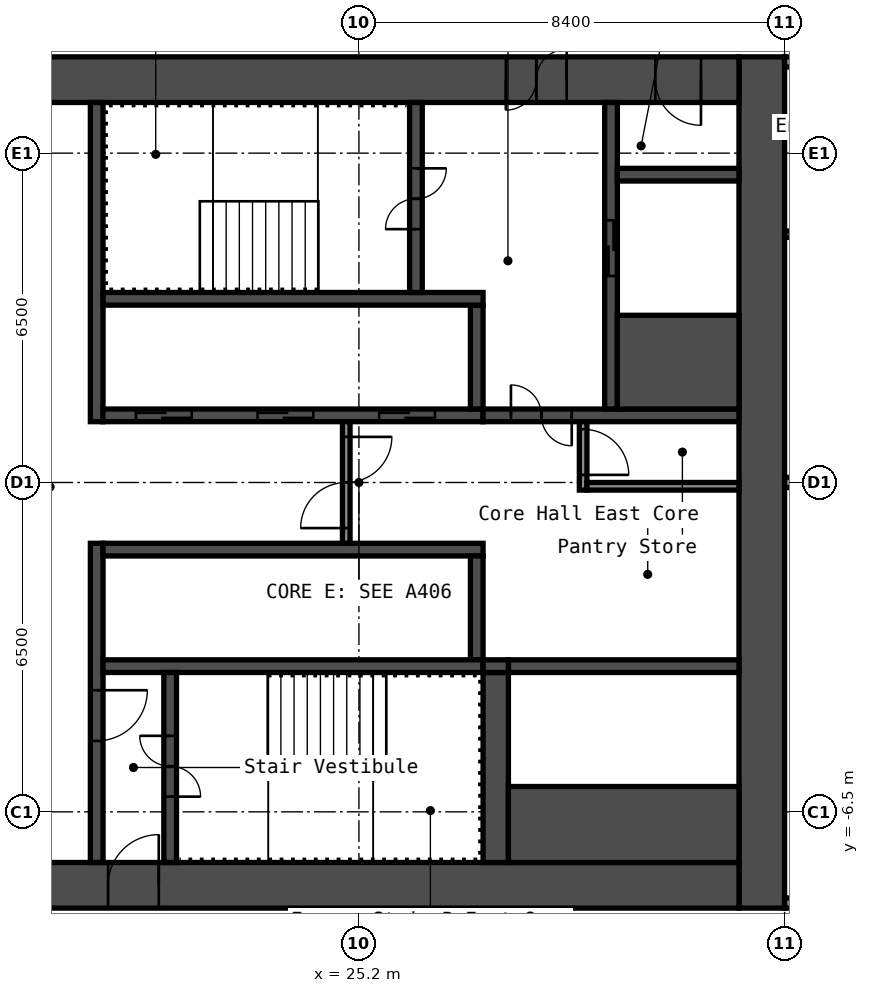
"""IFC4 building model, lengths in metres.
Left out: names, types, materials, properties, quantities, classifications, styles, units other than length and angle.
Written with IfcOpenShell. Run it as: python <this file> out.ifc"""

import sys

from ifc_helpers import new_model, si_unit, direction, frame, frame_2d, origin, place, context, subcontext, project, spatial, rectangle, extrude, element, fill, save


model = new_model("IFC4")
c1 = context("Model", 3, precision=1e-05, world=origin(), true_north=direction((0.0, 1.0)))
c2 = subcontext(c1, "Body", "Model", "MODEL_VIEW")
j1 = project(units=[si_unit("LENGTHUNIT", "METRE"), si_unit("PLANEANGLEUNIT", "RADIAN")], contexts=[c1])
p1 = place(None, origin())
s1 = spatial("IfcSite", under=j1, at=p1, CompositionType="ELEMENT")
p2 = place(p1, origin())
s2 = spatial("IfcBuilding", under=s1, at=p2, CompositionType="ELEMENT")
p3 = place(p2, frame((0.0, 0.0, 45.4)))
s3 = spatial("IfcBuildingStorey", under=s2, at=p3, CompositionType="ELEMENT", Elevation=45.4)
p4 = place(p3, frame((33.15, -8.4, 0.0), z_axis=(0.0, 0.0, 1.0), x_axis=(0.0, 1.0, 0.0)))
e1 = element("IfcWall", 1, at=p4, inside=s3, PredefinedType="SHEAR", context=c2, shape_type="SweptSolid", body=[
    extrude(rectangle(XDim=16.8, YDim=0.9, at=frame_2d((8.4, 0.0))), origin(), (0.0, 0.0, 1.0), 2.8),
])
p5 = place(p3, frame((17.7, 7.95, 0.0), z_axis=(0.0, 0.0, 1.0), x_axis=(1.0, 0.0, 0.0)))
e2 = element("IfcWall", 2, at=p5, inside=s3, PredefinedType="SHEAR", context=c2, shape_type="SweptSolid", body=[
    extrude(rectangle(XDim=15.0, YDim=0.9, at=frame_2d((7.5, 0.0))), origin(), (0.0, 0.0, 1.0), 2.8),
])
p6 = place(p5, frame((10.4, 0.0, 0.0)))
e3 = element("IfcOpeningElement", 3, at=p6, cuts=e2, PredefinedType="OPENING", context=c2, shape_type="SweptSolid", body=[
    extrude(rectangle(XDim=1.2, YDim=2.1, at=frame_2d((0.6, 1.05))), frame((0.0, 0.46, 0.0), z_axis=(0.0, -1.0, 0.0), x_axis=(1.0, 0.0, 0.0)), (0.0, 0.0, 1.0), 0.92),
])
p7 = place(p5, frame((13.35, 0.0, 0.0)))
e4 = element("IfcOpeningElement", 4, at=p7, cuts=e2, PredefinedType="OPENING", context=c2, shape_type="SweptSolid", body=[
    extrude(rectangle(XDim=0.9, YDim=2.1, at=frame_2d((0.45, 1.05))), frame((0.0, 0.46, 0.0), z_axis=(0.0, -1.0, 0.0), x_axis=(1.0, 0.0, 0.0)), (0.0, 0.0, 1.0), 0.92),
])
p8 = place(p3, frame((17.7, -7.95, 0.0), z_axis=(0.0, 0.0, 1.0), x_axis=(1.0, 0.0, 0.0)))
e5 = element("IfcWall", 5, at=p8, inside=s3, PredefinedType="SHEAR", context=c2, shape_type="SweptSolid", body=[
    extrude(rectangle(XDim=15.0, YDim=0.9, at=frame_2d((7.5, 0.0))), origin(), (0.0, 0.0, 1.0), 2.8),
])
p9 = place(p8, frame((2.55, 0.0, 0.0)))
e6 = element("IfcOpeningElement", 6, at=p9, cuts=e5, PredefinedType="OPENING", context=c2, shape_type="SweptSolid", body=[
    extrude(rectangle(XDim=1.0, YDim=2.1, at=frame_2d((0.5, 1.05))), frame((0.0, 0.46, 0.0), z_axis=(0.0, -1.0, 0.0), x_axis=(1.0, 0.0, 0.0)), (0.0, 0.0, 1.0), 0.92),
])
p10 = place(p3, frame((20.025, 1.2, 0.0), z_axis=(0.0, 0.0, 1.0), x_axis=(0.0, 1.0, 0.0)))
e7 = element("IfcWall", 7, at=p10, inside=s3, PredefinedType="SHEAR", context=c2, shape_type="SweptSolid", body=[
    extrude(rectangle(XDim=6.3, YDim=0.25, at=frame_2d((3.15, 0.0))), origin(), (0.0, 0.0, 1.0), 2.8),
])
p11 = place(p3, frame((20.025, -7.5, 0.0), z_axis=(0.0, 0.0, 1.0), x_axis=(0.0, 1.0, 0.0)))
e8 = element("IfcWall", 8, at=p11, inside=s3, PredefinedType="SHEAR", context=c2, shape_type="SweptSolid", body=[
    extrude(rectangle(XDim=6.3, YDim=0.25, at=frame_2d((3.15, 0.0))), origin(), (0.0, 0.0, 1.0), 2.8),
])
p12 = place(p11, frame((2.4, 0.0, 0.0)))
e9 = element("IfcOpeningElement", 9, at=p12, cuts=e8, PredefinedType="OPENING", context=c2, shape_type="SweptSolid", body=[
    extrude(rectangle(XDim=1.0, YDim=2.1, at=frame_2d((0.5, 1.05))), frame((0.0, 0.135, 0.0), z_axis=(0.0, -1.0, 0.0), x_axis=(1.0, 0.0, 0.0)), (0.0, 0.0, 1.0), 0.27),
])
p13 = place(p3, frame((20.15, 1.325, 0.0), z_axis=(0.0, 0.0, 1.0), x_axis=(1.0, 0.0, 0.0)))
e10 = element("IfcWall", 10, at=p13, inside=s3, PredefinedType="SHEAR", context=c2, shape_type="SweptSolid", body=[
    extrude(rectangle(XDim=7.5, YDim=0.25, at=frame_2d((3.75, 0.0))), origin(), (0.0, 0.0, 1.0), 2.8),
])
p14 = place(p13, frame((0.65, 0.0, 0.0)))
e11 = element("IfcOpeningElement", 11, at=p14, cuts=e10, PredefinedType="OPENING", context=c2, shape_type="SweptSolid", body=[
    extrude(rectangle(XDim=1.1, YDim=2.1, at=frame_2d((0.55, 1.05))), frame((0.0, 0.135, 0.0), z_axis=(0.0, -1.0, 0.0), x_axis=(1.0, 0.0, 0.0)), (0.0, 0.0, 1.0), 0.27),
])
p15 = place(p13, frame((3.05, 0.0, 0.0)))
e12 = element("IfcOpeningElement", 12, at=p15, cuts=e10, PredefinedType="OPENING", context=c2, shape_type="SweptSolid", body=[
    extrude(rectangle(XDim=1.1, YDim=2.1, at=frame_2d((0.55, 1.05))), frame((0.0, 0.135, 0.0), z_axis=(0.0, -1.0, 0.0), x_axis=(1.0, 0.0, 0.0)), (0.0, 0.0, 1.0), 0.27),
])
p16 = place(p13, frame((5.45, 0.0, 0.0)))
e13 = element("IfcOpeningElement", 13, at=p16, cuts=e10, PredefinedType="OPENING", context=c2, shape_type="SweptSolid", body=[
    extrude(rectangle(XDim=1.1, YDim=2.1, at=frame_2d((0.55, 1.05))), frame((0.0, 0.135, 0.0), z_axis=(0.0, -1.0, 0.0), x_axis=(1.0, 0.0, 0.0)), (0.0, 0.0, 1.0), 0.27),
])
p17 = place(p3, frame((27.525, 1.45, 0.0), z_axis=(0.0, 0.0, 1.0), x_axis=(0.0, 1.0, 0.0)))
e14 = element("IfcWall", 14, at=p17, inside=s3, PredefinedType="SHEAR", context=c2, shape_type="SweptSolid", body=[
    extrude(rectangle(XDim=2.05, YDim=0.25, at=frame_2d((1.025, 0.0))), origin(), (0.0, 0.0, 1.0), 2.8),
])
p18 = place(p3, frame((20.15, 3.625, 0.0), z_axis=(0.0, 0.0, 1.0), x_axis=(1.0, 0.0, 0.0)))
e15 = element("IfcWall", 15, at=p18, inside=s3, PredefinedType="SHEAR", context=c2, shape_type="SweptSolid", body=[
    extrude(rectangle(XDim=7.5, YDim=0.25, at=frame_2d((3.75, 0.0))), origin(), (0.0, 0.0, 1.0), 2.8),
])
p19 = place(p3, frame((26.325, 3.75, 0.0), z_axis=(0.0, 0.0, 1.0), x_axis=(0.0, 1.0, 0.0)))
e16 = element("IfcWall", 16, at=p19, inside=s3, PredefinedType="SHEAR", context=c2, shape_type="SweptSolid", body=[
    extrude(rectangle(XDim=3.75, YDim=0.25, at=frame_2d((1.875, 0.0))), origin(), (0.0, 0.0, 1.0), 2.8),
])
p20 = place(p19, frame((1.25, 0.0, 0.0)))
e17 = element("IfcOpeningElement", 17, at=p20, cuts=e16, PredefinedType="OPENING", context=c2, shape_type="SweptSolid", body=[
    extrude(rectangle(XDim=1.2, YDim=2.1, at=frame_2d((0.6, 1.05))), frame((0.0, 0.135, 0.0), z_axis=(0.0, -1.0, 0.0), x_axis=(1.0, 0.0, 0.0)), (0.0, 0.0, 1.0), 0.27),
])
p21 = place(p3, frame((27.65, 1.325, 0.0), z_axis=(0.0, 0.0, 1.0), x_axis=(1.0, 0.0, 0.0)))
e18 = element("IfcWall", 18, at=p21, inside=s3, PredefinedType="SHEAR", context=c2, shape_type="SweptSolid", body=[
    extrude(rectangle(XDim=5.05, YDim=0.25, at=frame_2d((2.525, 0.0))), origin(), (0.0, 0.0, 1.0), 2.8),
])
p22 = place(p21, frame((0.55, 0.0, 0.0)))
e19 = element("IfcOpeningElement", 19, at=p22, cuts=e18, PredefinedType="OPENING", context=c2, shape_type="SweptSolid", body=[
    extrude(rectangle(XDim=1.2, YDim=2.1, at=frame_2d((0.6, 1.05))), frame((0.0, 0.135, 0.0), z_axis=(0.0, -1.0, 0.0), x_axis=(1.0, 0.0, 0.0)), (0.0, 0.0, 1.0), 0.27),
])
p23 = place(p3, frame((30.175, 1.45, 0.0), z_axis=(0.0, 0.0, 1.0), x_axis=(0.0, 1.0, 0.0)))
e20 = element("IfcWall", 20, at=p23, inside=s3, PredefinedType="SHEAR", context=c2, shape_type="SweptSolid", body=[
    extrude(rectangle(XDim=6.05, YDim=0.25, at=frame_2d((3.025, 0.0))), origin(), (0.0, 0.0, 1.0), 2.8),
])
p24 = place(p23, frame((2.625, 0.0, 0.0)))
e21 = element("IfcOpeningElement", 21, at=p24, cuts=e20, PredefinedType="OPENING", context=c2, shape_type="SweptSolid", body=[
    extrude(rectangle(XDim=1.1, YDim=2.1, at=frame_2d((0.55, 1.05))), frame((0.0, 0.135, 0.0), z_axis=(0.0, -1.0, 0.0), x_axis=(1.0, 0.0, 0.0)), (0.0, 0.0, 1.0), 0.27),
])
p25 = place(p3, frame((30.3, 2.375, 0.0), z_axis=(0.0, 0.0, 1.0), x_axis=(1.0, 0.0, 0.0)))
e22 = element("IfcWall", 22, at=p25, inside=s3, PredefinedType="SHEAR", context=c2, shape_type="SweptSolid", body=[
    extrude(rectangle(XDim=2.4, YDim=1.85, at=frame_2d((1.2, 0.0))), origin(), (0.0, 0.0, 1.0), 2.8),
])
p26 = place(p3, frame((30.3, 6.075, 0.0), z_axis=(0.0, 0.0, 1.0), x_axis=(1.0, 0.0, 0.0)))
e23 = element("IfcWall", 23, at=p26, inside=s3, PredefinedType="SHEAR", context=c2, shape_type="SweptSolid", body=[
    extrude(rectangle(XDim=2.4, YDim=0.25, at=frame_2d((1.2, 0.0))), origin(), (0.0, 0.0, 1.0), 2.8),
])
p27 = place(p3, frame((20.15, -1.325, 0.0), z_axis=(0.0, 0.0, 1.0), x_axis=(1.0, 0.0, 0.0)))
e24 = element("IfcWall", 24, at=p27, inside=s3, PredefinedType="SHEAR", context=c2, shape_type="SweptSolid", body=[
    extrude(rectangle(XDim=7.5, YDim=0.25, at=frame_2d((3.75, 0.0))), origin(), (0.0, 0.0, 1.0), 2.8),
])
p28 = place(p3, frame((27.525, -3.5, 0.0), z_axis=(0.0, 0.0, 1.0), x_axis=(0.0, 1.0, 0.0)))
e25 = element("IfcWall", 25, at=p28, inside=s3, PredefinedType="SHEAR", context=c2, shape_type="SweptSolid", body=[
    extrude(rectangle(XDim=2.05, YDim=0.25, at=frame_2d((1.025, 0.0))), origin(), (0.0, 0.0, 1.0), 2.8),
])
p29 = place(p3, frame((20.15, -3.625, 0.0), z_axis=(0.0, 0.0, 1.0), x_axis=(1.0, 0.0, 0.0)))
e26 = element("IfcWall", 26, at=p29, inside=s3, PredefinedType="SHEAR", context=c2, shape_type="SweptSolid", body=[
    extrude(rectangle(XDim=7.5, YDim=0.25, at=frame_2d((3.75, 0.0))), origin(), (0.0, 0.0, 1.0), 2.8),
])
p30 = place(p3, frame((21.475, -7.5, 0.0), z_axis=(0.0, 0.0, 1.0), x_axis=(0.0, 1.0, 0.0)))
e27 = element("IfcWall", 27, at=p30, inside=s3, PredefinedType="SHEAR", context=c2, shape_type="SweptSolid", body=[
    extrude(rectangle(XDim=3.75, YDim=0.25, at=frame_2d((1.875, 0.0))), origin(), (0.0, 0.0, 1.0), 2.8),
])
p31 = place(p30, frame((1.3, 0.0, 0.0)))
e28 = element("IfcOpeningElement", 28, at=p31, cuts=e27, PredefinedType="OPENING", context=c2, shape_type="SweptSolid", body=[
    extrude(rectangle(XDim=1.2, YDim=2.1, at=frame_2d((0.6, 1.05))), frame((0.0, 0.135, 0.0), z_axis=(0.0, -1.0, 0.0), x_axis=(1.0, 0.0, 0.0)), (0.0, 0.0, 1.0), 0.27),
])
p32 = place(p3, frame((27.9, -7.5, 0.0), z_axis=(0.0, 0.0, 1.0), x_axis=(0.0, 1.0, 0.0)))
e29 = element("IfcWall", 29, at=p32, inside=s3, PredefinedType="SHEAR", context=c2, shape_type="SweptSolid", body=[
    extrude(rectangle(XDim=3.75, YDim=0.5, at=frame_2d((1.875, 0.0))), origin(), (0.0, 0.0, 1.0), 2.8),
])
p33 = place(p3, frame((28.15, -3.625, 0.0), z_axis=(0.0, 0.0, 1.0), x_axis=(1.0, 0.0, 0.0)))
e30 = element("IfcWall", 30, at=p33, inside=s3, PredefinedType="SHEAR", context=c2, shape_type="SweptSolid", body=[
    extrude(rectangle(XDim=4.55, YDim=0.25, at=frame_2d((2.275, 0.0))), origin(), (0.0, 0.0, 1.0), 2.8),
])
p34 = place(p3, frame((28.15, -6.75, 0.0), z_axis=(0.0, 0.0, 1.0), x_axis=(1.0, 0.0, 0.0)))
e31 = element("IfcWall", 31, at=p34, inside=s3, PredefinedType="SHEAR", context=c2, shape_type="SweptSolid", body=[
    extrude(rectangle(XDim=4.55, YDim=1.5, at=frame_2d((2.275, 0.0))), origin(), (0.0, 0.0, 1.0), 2.8),
])
p35 = place(p3, frame((27.65, -3.625, 0.0), z_axis=(0.0, 0.0, 1.0), x_axis=(1.0, 0.0, 0.0)))
e32 = element("IfcWall", 32, at=p35, inside=s3, PredefinedType="SHEAR", context=c2, shape_type="SweptSolid", body=[
    extrude(rectangle(XDim=0.5, YDim=0.25, at=frame_2d((0.25, 0.0))), origin(), (0.0, 0.0, 1.0), 2.8),
])
p36 = place(p3, frame((24.95, -1.2, 0.0), z_axis=(0.0, 0.0, 1.0), x_axis=(0.0, 1.0, 0.0)))
e33 = element("IfcWall", 33, at=p36, inside=s3, PredefinedType="PARTITIONING", context=c2, shape_type="SweptSolid", body=[
    extrude(rectangle(XDim=2.4, YDim=0.15, at=frame_2d((1.2, 0.0))), origin(), (0.0, 0.0, 1.0), 2.8),
])
p37 = place(p36, frame((0.3, 0.0, 0.0)))
e34 = element("IfcOpeningElement", 34, at=p37, cuts=e33, PredefinedType="OPENING", context=c2, shape_type="SweptSolid", body=[
    extrude(rectangle(XDim=1.8, YDim=2.1, at=frame_2d((0.9, 1.05))), frame((0.0, 0.085, 0.0), z_axis=(0.0, -1.0, 0.0), x_axis=(1.0, 0.0, 0.0)), (0.0, 0.0, 1.0), 0.17),
])
p38 = place(p3, frame((29.625, -0.15, 0.0), z_axis=(0.0, 0.0, 1.0), x_axis=(0.0, 1.0, 0.0)))
e35 = element("IfcWall", 35, at=p38, inside=s3, PredefinedType="PARTITIONING", context=c2, shape_type="SweptSolid", body=[
    extrude(rectangle(XDim=1.35, YDim=0.15, at=frame_2d((0.675, 0.0))), origin(), (0.0, 0.0, 1.0), 2.8),
])
p39 = place(p38, frame((0.3, 0.0, 0.0)))
e36 = element("IfcOpeningElement", 36, at=p39, cuts=e35, PredefinedType="OPENING", context=c2, shape_type="SweptSolid", body=[
    extrude(rectangle(XDim=0.9, YDim=2.1, at=frame_2d((0.45, 1.05))), frame((0.0, 0.085, 0.0), z_axis=(0.0, -1.0, 0.0), x_axis=(1.0, 0.0, 0.0)), (0.0, 0.0, 1.0), 0.17),
])
p40 = place(p3, frame((29.7, -0.075, 0.0), z_axis=(0.0, 0.0, 1.0), x_axis=(1.0, 0.0, 0.0)))
e37 = element("IfcWall", 37, at=p40, inside=s3, PredefinedType="PARTITIONING", context=c2, shape_type="SweptSolid", body=[
    extrude(rectangle(XDim=3.0, YDim=0.15, at=frame_2d((1.5, 0.0))), origin(), (0.0, 0.0, 1.0), 2.8),
])
p41 = place(p3, frame((33.6, -8.3, 0.0), z_axis=(0.0, 0.0, 1.0), x_axis=(1.0, 0.0, 0.0)))
e38 = element("IfcWall", 38, at=p41, inside=s3, PredefinedType="PARTITIONING", context=c2, shape_type="SweptSolid", body=[
    extrude(rectangle(XDim=15.0, YDim=0.2, at=frame_2d((7.5, 0.0))), origin(), (0.0, 0.0, 1.0), 2.8),
])
p42 = place(p41, frame((3.7, 0.0, 0.0)))
e39 = element("IfcOpeningElement", 39, at=p42, cuts=e38, PredefinedType="OPENING", context=c2, shape_type="SweptSolid", body=[
    extrude(rectangle(XDim=1.0, YDim=2.1, at=frame_2d((0.5, 1.05))), frame((0.0, 0.11, 0.0), z_axis=(0.0, -1.0, 0.0), x_axis=(1.0, 0.0, 0.0)), (0.0, 0.0, 1.0), 0.22),
])
p43 = place(p41, frame((9.5, 0.0, 0.0)))
e40 = element("IfcOpeningElement", 40, at=p43, cuts=e38, PredefinedType="OPENING", context=c2, shape_type="SweptSolid", body=[
    extrude(rectangle(XDim=1.0, YDim=2.1, at=frame_2d((0.5, 1.05))), frame((0.0, 0.11, 0.0), z_axis=(0.0, -1.0, 0.0), x_axis=(1.0, 0.0, 0.0)), (0.0, 0.0, 1.0), 0.22),
])
p44 = place(p3, frame((33.6, 0.0, 0.0), z_axis=(0.0, 0.0, 1.0), x_axis=(1.0, 0.0, 0.0)))
e41 = element("IfcWall", 41, at=p44, inside=s3, PredefinedType="PARTITIONING", context=c2, shape_type="SweptSolid", body=[
    extrude(rectangle(XDim=14.9, YDim=0.2, at=frame_2d((7.45, 0.0))), origin(), (0.0, 0.0, 1.0), 2.8),
])
p45 = place(p3, frame((33.6, 4.9, 0.0), z_axis=(0.0, 0.0, 1.0), x_axis=(1.0, 0.0, 0.0)))
e42 = element("IfcWall", 42, at=p45, inside=s3, PredefinedType="PARTITIONING", context=c2, shape_type="SweptSolid", body=[
    extrude(rectangle(XDim=3.737, YDim=0.125, at=frame_2d((1.869, 0.0))), origin(), (0.0, 0.0, 1.0), 2.8),
])
p46 = place(p45, frame((1.5, 0.0, 0.0)))
e43 = element("IfcOpeningElement", 43, at=p46, cuts=e42, PredefinedType="OPENING", context=c2, shape_type="SweptSolid", body=[
    extrude(rectangle(XDim=0.8, YDim=2.1, at=frame_2d((0.4, 1.05))), frame((0.0, 0.073, 0.0), z_axis=(0.0, -1.0, 0.0), x_axis=(1.0, 0.0, 0.0)), (0.0, 0.0, 1.0), 0.145),
])
p47 = place(p3, frame((33.6, 8.3, 0.0), z_axis=(0.0, 0.0, 1.0), x_axis=(1.0, 0.0, 0.0)))
e44 = element("IfcWall", 44, at=p47, inside=s3, PredefinedType="PARTITIONING", context=c2, shape_type="SweptSolid", body=[
    extrude(rectangle(XDim=15.0, YDim=0.2, at=frame_2d((7.5, 0.0))), origin(), (0.0, 0.0, 1.0), 2.8),
])
p48 = place(p47, frame((9.55, 0.0, 0.0)))
e45 = element("IfcOpeningElement", 45, at=p48, cuts=e44, PredefinedType="OPENING", context=c2, shape_type="SweptSolid", body=[
    extrude(rectangle(XDim=1.6, YDim=2.1, at=frame_2d((0.8, 1.05))), frame((0.0, 0.11, 0.0), z_axis=(0.0, -1.0, 0.0), x_axis=(1.0, 0.0, 0.0)), (0.0, 0.0, 1.0), 0.22),
])
p49 = place(p6, origin())
e46 = element("IfcDoor", 46, at=p49, inside=s3, OperationType="DOUBLE_DOOR_SINGLE_SWING", PredefinedType="DOOR", context=c2, shape_type="SweptSolid", body=[
    extrude(rectangle(XDim=1.2, YDim=2.1, at=frame_2d((0.6, 1.05))), frame((0.0, 0.025, 0.0), z_axis=(0.0, -1.0, 0.0), x_axis=(1.0, 0.0, 0.0)), (0.0, 0.0, 1.0), 0.05),
])
fill(e3, e46)
p50 = place(p7, origin())
e47 = element("IfcDoor", 47, at=p50, inside=s3, OperationType="SINGLE_SWING_RIGHT", PredefinedType="DOOR", context=c2, shape_type="SweptSolid", body=[
    extrude(rectangle(XDim=0.9, YDim=2.1, at=frame_2d((0.45, 1.05))), frame((0.0, 0.025, 0.0), z_axis=(0.0, -1.0, 0.0), x_axis=(1.0, 0.0, 0.0)), (0.0, 0.0, 1.0), 0.05),
])
fill(e4, e47)
p51 = place(p9, origin())
e48 = element("IfcDoor", 48, at=p51, inside=s3, OperationType="SINGLE_SWING_LEFT", PredefinedType="DOOR", context=c2, shape_type="SweptSolid", body=[
    extrude(rectangle(XDim=1.0, YDim=2.1, at=frame_2d((0.5, 1.05))), frame((0.0, 0.025, 0.0), z_axis=(0.0, -1.0, 0.0), x_axis=(1.0, 0.0, 0.0)), (0.0, 0.0, 1.0), 0.05),
])
fill(e6, e48)
p52 = place(p20, origin())
e49 = element("IfcDoor", 49, at=p52, inside=s3, OperationType="DOUBLE_DOOR_SINGLE_SWING", PredefinedType="DOOR", context=c2, shape_type="SweptSolid", body=[
    extrude(rectangle(XDim=1.2, YDim=2.1, at=frame_2d((0.6, 1.05))), frame((0.0, 0.025, 0.0), z_axis=(0.0, -1.0, 0.0), x_axis=(1.0, 0.0, 0.0)), (0.0, 0.0, 1.0), 0.05),
])
fill(e17, e49)
p53 = place(p31, origin())
e50 = element("IfcDoor", 50, at=p53, inside=s3, OperationType="DOUBLE_DOOR_SINGLE_SWING", PredefinedType="DOOR", context=c2, shape_type="SweptSolid", body=[
    extrude(rectangle(XDim=1.2, YDim=2.1, at=frame_2d((0.6, 1.05))), frame((0.0, 0.025, 0.0), z_axis=(0.0, -1.0, 0.0), x_axis=(1.0, 0.0, 0.0)), (0.0, 0.0, 1.0), 0.05),
])
fill(e28, e50)
p54 = place(p12, origin())
e51 = element("IfcDoor", 51, at=p54, inside=s3, OperationType="SINGLE_SWING_RIGHT", PredefinedType="DOOR", context=c2, shape_type="SweptSolid", body=[
    extrude(rectangle(XDim=1.0, YDim=2.1, at=frame_2d((0.5, 1.05))), frame((0.0, 0.025, 0.0), z_axis=(0.0, -1.0, 0.0), x_axis=(1.0, 0.0, 0.0)), (0.0, 0.0, 1.0), 0.05),
])
fill(e9, e51)
p55 = place(p22, origin())
e52 = element("IfcDoor", 52, at=p55, inside=s3, OperationType="DOUBLE_DOOR_SINGLE_SWING", PredefinedType="DOOR", context=c2, shape_type="SweptSolid", body=[
    extrude(rectangle(XDim=1.2, YDim=2.1, at=frame_2d((0.6, 1.05))), frame((0.0, 0.025, 0.0), z_axis=(0.0, -1.0, 0.0), x_axis=(1.0, 0.0, 0.0)), (0.0, 0.0, 1.0), 0.05),
])
fill(e19, e52)
p56 = place(p37, origin())
e53 = element("IfcDoor", 53, at=p56, inside=s3, OperationType="DOUBLE_DOOR_SINGLE_SWING", PredefinedType="DOOR", context=c2, shape_type="SweptSolid", body=[
    extrude(rectangle(XDim=1.8, YDim=2.1, at=frame_2d((0.9, 1.05))), frame((0.0, 0.025, 0.0), z_axis=(0.0, -1.0, 0.0), x_axis=(1.0, 0.0, 0.0)), (0.0, 0.0, 1.0), 0.05),
])
fill(e34, e53)
p57 = place(p39, origin())
e54 = element("IfcDoor", 54, at=p57, inside=s3, OperationType="SINGLE_SWING_LEFT", PredefinedType="DOOR", context=c2, shape_type="SweptSolid", body=[
    extrude(rectangle(XDim=0.9, YDim=2.1, at=frame_2d((0.45, 1.05))), frame((0.0, 0.025, 0.0), z_axis=(0.0, -1.0, 0.0), x_axis=(1.0, 0.0, 0.0)), (0.0, 0.0, 1.0), 0.05),
])
fill(e36, e54)
p58 = place(p14, origin())
e55 = element("IfcDoor", 55, at=p58, inside=s3, OperationType="DOUBLE_DOOR_SLIDING", PredefinedType="DOOR", context=c2, shape_type="SweptSolid", body=[
    extrude(rectangle(XDim=1.1, YDim=2.1, at=frame_2d((0.55, 1.05))), frame((0.0, 0.025, 0.0), z_axis=(0.0, -1.0, 0.0), x_axis=(1.0, 0.0, 0.0)), (0.0, 0.0, 1.0), 0.05),
])
fill(e11, e55)
p59 = place(p15, origin())
e56 = element("IfcDoor", 56, at=p59, inside=s3, OperationType="DOUBLE_DOOR_SLIDING", PredefinedType="DOOR", context=c2, shape_type="SweptSolid", body=[
    extrude(rectangle(XDim=1.1, YDim=2.1, at=frame_2d((0.55, 1.05))), frame((0.0, 0.025, 0.0), z_axis=(0.0, -1.0, 0.0), x_axis=(1.0, 0.0, 0.0)), (0.0, 0.0, 1.0), 0.05),
])
fill(e12, e56)
p60 = place(p16, origin())
e57 = element("IfcDoor", 57, at=p60, inside=s3, OperationType="DOUBLE_DOOR_SLIDING", PredefinedType="DOOR", context=c2, shape_type="SweptSolid", body=[
    extrude(rectangle(XDim=1.1, YDim=2.1, at=frame_2d((0.55, 1.05))), frame((0.0, 0.025, 0.0), z_axis=(0.0, -1.0, 0.0), x_axis=(1.0, 0.0, 0.0)), (0.0, 0.0, 1.0), 0.05),
])
fill(e13, e57)
p61 = place(p24, origin())
e58 = element("IfcDoor", 58, at=p61, inside=s3, OperationType="DOUBLE_DOOR_SLIDING", PredefinedType="DOOR", context=c2, shape_type="SweptSolid", body=[
    extrude(rectangle(XDim=1.1, YDim=2.1, at=frame_2d((0.55, 1.05))), frame((0.0, 0.025, 0.0), z_axis=(0.0, -1.0, 0.0), x_axis=(1.0, 0.0, 0.0)), (0.0, 0.0, 1.0), 0.05),
])
fill(e21, e58)
save(model, sys.argv[1])
